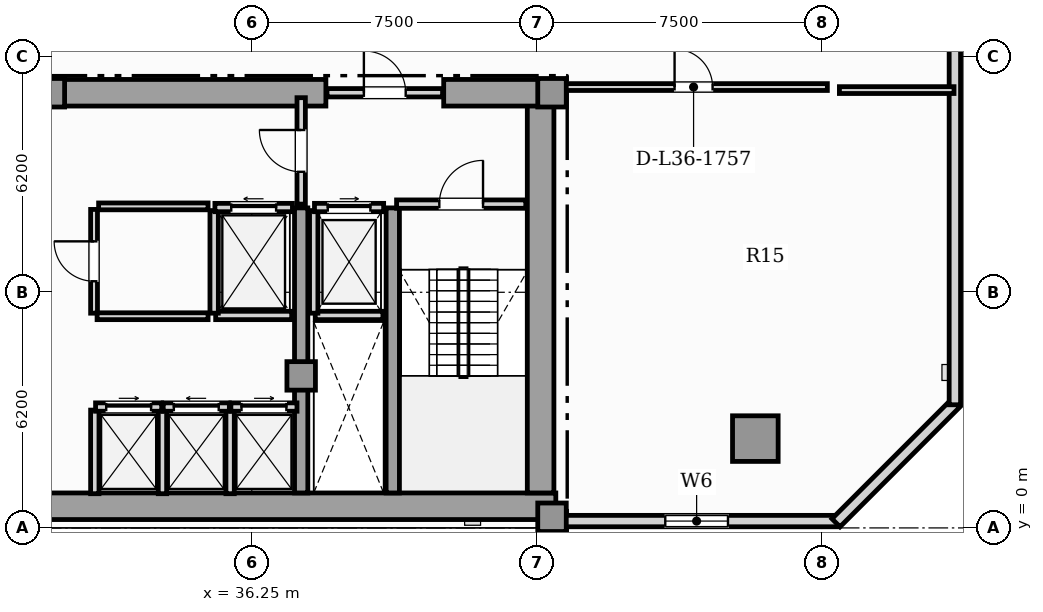
"""IFC4 building model, lengths in metres.
Left out: names, types, materials, properties, quantities, classifications, styles, units other than length and angle.
Written with IfcOpenShell. Run it as: python <this file> out.ifc"""

import sys

from ifc_helpers import new_model, si_unit, direction, frame, frame_2d, origin, origin_2d, place, context, subcontext, project, spatial, rectangle, hollow_rectangle, extrude, element, fill, save


model = new_model("IFC4")
c1 = context("Model", 3, precision=1e-05, world=origin(), true_north=direction((0.0, 1.0)))
c2 = subcontext(c1, "Body", "Model", "MODEL_VIEW")
j1 = project(units=[si_unit("LENGTHUNIT", "METRE"), si_unit("PLANEANGLEUNIT", "RADIAN")], contexts=[c1])
p1 = place(None, origin())
s1 = spatial("IfcSite", under=j1, at=p1, CompositionType="ELEMENT")
p2 = place(p1, origin())
s2 = spatial("IfcBuilding", under=s1, at=p2, CompositionType="ELEMENT")
p3 = place(p2, frame((0.0, 0.0, 149.05)))
s3 = spatial("IfcBuildingStorey", under=s2, at=p3, CompositionType="ELEMENT", Elevation=149.05)
p4 = place(p3, frame((13.25, 0.57, 0.0), z_axis=(0.0, 0.0, 1.0), x_axis=(1.0, 0.0, 0.0)))
e1 = element("IfcWall", 1, at=p4, inside=s3, PredefinedType="SHEAR", context=c2, shape_type="SweptSolid", body=[
    extrude(rectangle(XDim=31.0, YDim=0.7, at=frame_2d((15.5, 0.0))), origin(), (0.0, 0.0, 1.0), 3.63),
])
p5 = place(p3, frame((43.85, 0.92, 0.0), z_axis=(0.0, 0.0, 1.0), x_axis=(0.0, 1.0, 0.0)))
e2 = element("IfcWall", 2, at=p5, inside=s3, PredefinedType="SHEAR", context=c2, shape_type="SweptSolid", body=[
    extrude(rectangle(XDim=10.53, YDim=0.7, at=frame_2d((5.265, 0.0))), origin(), (0.0, 0.0, 1.0), 3.63),
])
p6 = place(p3, frame((30.9, 11.45, 0.0), z_axis=(0.0, 0.0, 1.0), x_axis=(1.0, 0.0, 0.0)))
e3 = element("IfcWall", 3, at=p6, inside=s3, PredefinedType="SHEAR", context=c2, shape_type="SweptSolid", body=[
    extrude(rectangle(XDim=7.3, YDim=0.7, at=frame_2d((3.65, 0.0))), origin(), (0.0, 0.0, 1.0), 3.63),
])
p7 = place(p3, frame((41.3, 11.45, 0.0), z_axis=(0.0, 0.0, 1.0), x_axis=(1.0, 0.0, 0.0)))
e4 = element("IfcWall", 4, at=p7, inside=s3, PredefinedType="SHEAR", context=c2, shape_type="SweptSolid", body=[
    extrude(rectangle(XDim=2.95, YDim=0.7, at=frame_2d((1.475, 0.0))), origin(), (0.0, 0.0, 1.0), 3.63),
])
for number, where, z_axis, x_axis in (
    (5, (37.55, 0.92, 0.0), (0.0, 0.0, 1.0), (0.0, 1.0, 0.0)),
    (6, (39.96, 0.92, 0.0), (0.0, 0.0, 1.0), (0.0, 1.0, 0.0)),
):
    element("IfcWall", number, at=place(p3, frame(where, z_axis=z_axis, x_axis=x_axis)), inside=s3, PredefinedType="SHEAR", context=c2, shape_type="SweptSolid", body=[
        extrude(rectangle(XDim=7.5, YDim=0.35, at=frame_2d((3.75, 0.0))), origin(), (0.0, 0.0, 1.0), 3.63),
    ])
for number, where, z_axis, x_axis in (
    (7, (44.15, 0.28, 0.0), (0.0, 0.0, 1.0), (1.0, 0.0, 0.0)),
    (8, (44.15, 11.45, 0.0), (0.0, 0.0, 1.0), (1.0, 0.0, 0.0)),
    (9, (37.55, 4.0, 0.0), (0.0, 0.0, 1.0), (1.0, 0.0, 0.0)),
    (10, (30.95, 11.45, 0.0), (0.0, 0.0, 1.0), (1.0, 0.0, 0.0)),
):
    element("IfcColumn", number, at=place(p3, frame(where, z_axis=z_axis, x_axis=x_axis)), inside=s3, PredefinedType="COLUMN", context=c2, shape_type="SweptSolid", body=[
        extrude(rectangle(XDim=0.75, YDim=0.75, at=origin_2d()), origin(), (0.0, 0.0, 1.0), 3.85),
    ])
p8 = place(p3, frame((49.5, 2.35, 0.0), z_axis=(0.0, 0.0, 1.0), x_axis=(1.0, 0.0, 0.0)))
e11 = element("IfcColumn", 11, at=p8, inside=s3, PredefinedType="USERDEFINED", context=c2, shape_type="SweptSolid", body=[
    extrude(hollow_rectangle(XDim=1.2, YDim=1.2, WallThickness=0.07, at=origin_2d()), origin(), (0.0, 0.0, 1.0), 3.85),
])
p9 = place(p3, frame((44.25, 0.18, 0.0), z_axis=(0.0, 0.0, 1.0), x_axis=(1.0, 0.0, 0.0)))
e12 = element("IfcWall", 12, at=p9, inside=s3, PredefinedType="SOLIDWALL", context=c2, shape_type="SweptSolid", body=[
    extrude(rectangle(XDim=7.41, YDim=0.3, at=frame_2d((3.705, 0.0))), origin(), (0.0, 0.0, 1.0), 3.63),
])
p10 = place(p9, frame((2.88, 0.0, 0.88)))
e13 = element("IfcOpeningElement", 13, at=p10, cuts=e12, PredefinedType="OPENING", context=c2, shape_type="SweptSolid", body=[
    extrude(rectangle(XDim=1.65, YDim=2.0, at=frame_2d((0.825, 1.0))), frame((0.0, 0.16, 0.0), z_axis=(0.0, -1.0, 0.0), x_axis=(1.0, 0.0, 0.0)), (0.0, 0.0, 1.0), 0.32),
])
p11 = place(p3, frame((51.622, 0.135, 0.0), z_axis=(0.0, 0.0, 1.0), x_axis=(0.707106781187, 0.707106781187, 0.0)))
e14 = element("IfcWall", 14, at=p11, inside=s3, PredefinedType="SOLIDWALL", context=c2, shape_type="SweptSolid", body=[
    extrude(rectangle(XDim=4.445, YDim=0.3, at=frame_2d((2.223, 0.0))), origin(), (0.0, 0.0, 1.0), 3.63),
])
p12 = place(p3, frame((54.75, 3.24, 0.0), z_axis=(0.0, 0.0, 1.0), x_axis=(0.0, 1.0, 0.0)))
e15 = element("IfcWall", 15, at=p12, inside=s3, PredefinedType="SOLIDWALL", context=c2, shape_type="SweptSolid", body=[
    extrude(rectangle(XDim=36.72, YDim=0.3, at=frame_2d((18.36, 0.0))), origin(), (0.0, 0.0, 1.0), 3.63),
])
p13 = place(p12, frame((30.56, 0.0, 0.95)))
e16 = element("IfcOpeningElement", 16, at=p13, cuts=e15, PredefinedType="OPENING", context=c2, shape_type="SweptSolid", body=[
    extrude(rectangle(XDim=0.9, YDim=1.5, at=frame_2d((0.45, 0.75))), frame((0.0, 0.16, 0.0), z_axis=(0.0, -1.0, 0.0), x_axis=(1.0, 0.0, 0.0)), (0.0, 0.0, 1.0), 0.32),
])
p14 = place(p12, frame((10.995, 0.0, 0.95)))
e17 = element("IfcOpeningElement", 17, at=p14, cuts=e15, PredefinedType="OPENING", context=c2, shape_type="SweptSolid", body=[
    extrude(rectangle(XDim=0.9, YDim=1.5, at=frame_2d((0.45, 0.75))), frame((0.0, 0.16, 0.0), z_axis=(0.0, -1.0, 0.0), x_axis=(1.0, 0.0, 0.0)), (0.0, 0.0, 1.0), 0.32),
])
p15 = place(p12, frame((13.304, 0.0, 0.88)))
e18 = element("IfcOpeningElement", 18, at=p15, cuts=e15, PredefinedType="OPENING", context=c2, shape_type="SweptSolid", body=[
    extrude(rectangle(XDim=1.65, YDim=2.0, at=frame_2d((0.825, 1.0))), frame((0.0, 0.16, 0.0), z_axis=(0.0, -1.0, 0.0), x_axis=(1.0, 0.0, 0.0)), (0.0, 0.0, 1.0), 0.32),
])
p16 = place(p12, frame((18.021, 0.0, 0.88)))
e19 = element("IfcOpeningElement", 19, at=p16, cuts=e15, PredefinedType="OPENING", context=c2, shape_type="SweptSolid", body=[
    extrude(rectangle(XDim=1.65, YDim=2.0, at=frame_2d((0.825, 1.0))), frame((0.0, 0.16, 0.0), z_axis=(0.0, -1.0, 0.0), x_axis=(1.0, 0.0, 0.0)), (0.0, 0.0, 1.0), 0.32),
])
p17 = place(p12, frame((25.201, 0.0, 0.88)))
e20 = element("IfcOpeningElement", 20, at=p17, cuts=e15, PredefinedType="OPENING", context=c2, shape_type="SweptSolid", body=[
    extrude(rectangle(XDim=1.65, YDim=2.0, at=frame_2d((0.825, 1.0))), frame((0.0, 0.16, 0.0), z_axis=(0.0, -1.0, 0.0), x_axis=(1.0, 0.0, 0.0)), (0.0, 0.0, 1.0), 0.32),
])
p18 = place(p12, frame((32.759, 0.0, 0.88)))
e21 = element("IfcOpeningElement", 21, at=p18, cuts=e15, PredefinedType="OPENING", context=c2, shape_type="SweptSolid", body=[
    extrude(rectangle(XDim=1.65, YDim=2.0, at=frame_2d((0.825, 1.0))), frame((0.0, 0.16, 0.0), z_axis=(0.0, -1.0, 0.0), x_axis=(1.0, 0.0, 0.0)), (0.0, 0.0, 1.0), 0.32),
])
p19 = place(p3, frame((37.92, 5.59, 0.0), z_axis=(0.0, 0.0, 1.0), x_axis=(1.0, 0.0, 0.0)))
e22 = element("IfcWall", 22, at=p19, inside=s3, PredefinedType="SOLIDWALL", context=c2, shape_type="SweptSolid", body=[
    extrude(rectangle(XDim=1.78, YDim=0.22, at=frame_2d((0.89, 0.0))), origin(), (0.0, 0.0, 1.0), 3.63),
])
p20 = place(p3, frame((37.88, 5.65, 0.0), z_axis=(0.0, 0.0, 1.0), x_axis=(0.0, 1.0, 0.0)))
e23 = element("IfcWall", 23, at=p20, inside=s3, PredefinedType="SOLIDWALL", context=c2, shape_type="SweptSolid", body=[
    extrude(rectangle(XDim=2.7, YDim=0.22, at=frame_2d((1.35, 0.0))), origin(), (0.0, 0.0, 1.0), 3.63),
])
p21 = place(p3, frame((37.9, 8.43, 0.0), z_axis=(0.0, 0.0, 1.0), x_axis=(1.0, 0.0, 0.0)))
e24 = element("IfcWall", 24, at=p21, inside=s3, PredefinedType="SOLIDWALL", context=c2, shape_type="SweptSolid", body=[
    extrude(rectangle(XDim=1.82, YDim=0.22, at=frame_2d((0.91, 0.0))), origin(), (0.0, 0.0, 1.0), 3.63),
])
p22 = place(p21, frame((0.35, 0.0, 0.0)))
e25 = element("IfcOpeningElement", 25, at=p22, cuts=e24, PredefinedType="OPENING", context=c2, shape_type="SweptSolid", body=[
    extrude(rectangle(XDim=1.12, YDim=2.25, at=frame_2d((0.56, 1.125))), frame((0.0, 0.12, 0.0), z_axis=(0.0, -1.0, 0.0), x_axis=(1.0, 0.0, 0.0)), (0.0, 0.0, 1.0), 0.24),
])
p23 = place(p3, frame((35.3, 5.59, 0.0), z_axis=(0.0, 0.0, 1.0), x_axis=(1.0, 0.0, 0.0)))
e26 = element("IfcWall", 26, at=p23, inside=s3, PredefinedType="SOLIDWALL", context=c2, shape_type="SweptSolid", body=[
    extrude(rectangle(XDim=2.0, YDim=0.22, at=frame_2d((1.0, 0.0))), origin(), (0.0, 0.0, 1.0), 3.63),
])
p24 = place(p3, frame((35.26, 5.65, 0.0), z_axis=(0.0, 0.0, 1.0), x_axis=(0.0, 1.0, 0.0)))
e27 = element("IfcWall", 27, at=p24, inside=s3, PredefinedType="SOLIDWALL", context=c2, shape_type="SweptSolid", body=[
    extrude(rectangle(XDim=2.7, YDim=0.22, at=frame_2d((1.35, 0.0))), origin(), (0.0, 0.0, 1.0), 3.63),
])
p25 = place(p3, frame((35.28, 8.43, 0.0), z_axis=(0.0, 0.0, 1.0), x_axis=(1.0, 0.0, 0.0)))
e28 = element("IfcWall", 28, at=p25, inside=s3, PredefinedType="SOLIDWALL", context=c2, shape_type="SweptSolid", body=[
    extrude(rectangle(XDim=2.04, YDim=0.22, at=frame_2d((1.02, 0.0))), origin(), (0.0, 0.0, 1.0), 3.63),
])
p26 = place(p25, frame((0.43, 0.0, 0.0)))
e29 = element("IfcOpeningElement", 29, at=p26, cuts=e28, PredefinedType="OPENING", context=c2, shape_type="SweptSolid", body=[
    extrude(rectangle(XDim=1.18, YDim=2.2, at=frame_2d((0.59, 1.1))), frame((0.0, 0.12, 0.0), z_axis=(0.0, -1.0, 0.0), x_axis=(1.0, 0.0, 0.0)), (0.0, 0.0, 1.0), 0.24),
])
for number, where, z_axis, x_axis in (
    (30, (32.12, 0.9, 0.0), (0.0, 0.0, 1.0), (0.0, 1.0, 0.0)),
    (31, (33.9, 0.9, 0.0), (0.0, 0.0, 1.0), (0.0, 1.0, 0.0)),
):
    element("IfcWall", number, at=place(p3, frame(where, z_axis=z_axis, x_axis=x_axis)), inside=s3, PredefinedType="SOLIDWALL", context=c2, shape_type="SweptSolid", body=[
        extrude(rectangle(XDim=2.2, YDim=0.22, at=frame_2d((1.1, 0.0))), origin(), (0.0, 0.0, 1.0), 3.63),
    ])
p27 = place(p3, frame((32.14, 3.18, 0.0), z_axis=(0.0, 0.0, 1.0), x_axis=(1.0, 0.0, 0.0)))
e32 = element("IfcWall", 32, at=p27, inside=s3, PredefinedType="SOLIDWALL", context=c2, shape_type="SweptSolid", body=[
    extrude(rectangle(XDim=1.74, YDim=0.22, at=frame_2d((0.87, 0.0))), origin(), (0.0, 0.0, 1.0), 3.63),
])
p28 = place(p27, frame((0.28, 0.0, 0.0)))
e33 = element("IfcOpeningElement", 33, at=p28, cuts=e32, PredefinedType="OPENING", context=c2, shape_type="SweptSolid", body=[
    extrude(rectangle(XDim=1.18, YDim=2.2, at=frame_2d((0.59, 1.1))), frame((0.0, 0.12, 0.0), z_axis=(0.0, -1.0, 0.0), x_axis=(1.0, 0.0, 0.0)), (0.0, 0.0, 1.0), 0.24),
])
p29 = place(p3, frame((35.68, 0.9, 0.0), z_axis=(0.0, 0.0, 1.0), x_axis=(0.0, 1.0, 0.0)))
e34 = element("IfcWall", 34, at=p29, inside=s3, PredefinedType="SOLIDWALL", context=c2, shape_type="SweptSolid", body=[
    extrude(rectangle(XDim=2.2, YDim=0.22, at=frame_2d((1.1, 0.0))), origin(), (0.0, 0.0, 1.0), 3.63),
])
p30 = place(p3, frame((33.92, 3.18, 0.0), z_axis=(0.0, 0.0, 1.0), x_axis=(1.0, 0.0, 0.0)))
e35 = element("IfcWall", 35, at=p30, inside=s3, PredefinedType="SOLIDWALL", context=c2, shape_type="SweptSolid", body=[
    extrude(rectangle(XDim=1.74, YDim=0.22, at=frame_2d((0.87, 0.0))), origin(), (0.0, 0.0, 1.0), 3.63),
])
p31 = place(p30, frame((0.28, 0.0, 0.0)))
e36 = element("IfcOpeningElement", 36, at=p31, cuts=e35, PredefinedType="OPENING", context=c2, shape_type="SweptSolid", body=[
    extrude(rectangle(XDim=1.18, YDim=2.2, at=frame_2d((0.59, 1.1))), frame((0.0, 0.12, 0.0), z_axis=(0.0, -1.0, 0.0), x_axis=(1.0, 0.0, 0.0)), (0.0, 0.0, 1.0), 0.24),
])
p32 = place(p3, frame((35.7, 3.18, 0.0), z_axis=(0.0, 0.0, 1.0), x_axis=(1.0, 0.0, 0.0)))
e37 = element("IfcWall", 37, at=p32, inside=s3, PredefinedType="SOLIDWALL", context=c2, shape_type="SweptSolid", body=[
    extrude(rectangle(XDim=1.74, YDim=0.22, at=frame_2d((0.87, 0.0))), origin(), (0.0, 0.0, 1.0), 3.63),
])
p33 = place(p32, frame((0.28, 0.0, 0.0)))
e38 = element("IfcOpeningElement", 38, at=p33, cuts=e37, PredefinedType="OPENING", context=c2, shape_type="SweptSolid", body=[
    extrude(rectangle(XDim=1.18, YDim=2.2, at=frame_2d((0.59, 1.1))), frame((0.0, 0.12, 0.0), z_axis=(0.0, -1.0, 0.0), x_axis=(1.0, 0.0, 0.0)), (0.0, 0.0, 1.0), 0.24),
])
p34 = place(p3, frame((40.06, 8.52, 0.0), z_axis=(0.0, 0.0, 1.0), x_axis=(1.0, 0.0, 0.0)))
e39 = element("IfcWall", 39, at=p34, inside=s3, PredefinedType="SOLIDWALL", context=c2, shape_type="SweptSolid", body=[
    extrude(rectangle(XDim=3.4, YDim=0.22, at=frame_2d((1.7, 0.0))), origin(), (0.0, 0.0, 1.0), 3.63),
])
p35 = place(p34, frame((1.125, 0.0, 0.0)))
e40 = element("IfcOpeningElement", 40, at=p35, cuts=e39, PredefinedType="OPENING", context=c2, shape_type="SweptSolid", body=[
    extrude(rectangle(XDim=1.15, YDim=2.2, at=frame_2d((0.575, 1.1))), frame((0.0, 0.12, 0.0), z_axis=(0.0, -1.0, 0.0), x_axis=(1.0, 0.0, 0.0)), (0.0, 0.0, 1.0), 0.24),
])
p36 = place(p3, frame((37.55, 8.52, 0.0), z_axis=(0.0, 0.0, 1.0), x_axis=(0.0, 1.0, 0.0)))
e41 = element("IfcWall", 41, at=p36, inside=s3, PredefinedType="SOLIDWALL", context=c2, shape_type="SweptSolid", body=[
    extrude(rectangle(XDim=2.8, YDim=0.22, at=frame_2d((1.4, 0.0))), origin(), (0.0, 0.0, 1.0), 3.085),
])
p37 = place(p36, frame((0.85, 0.0, 0.0)))
e42 = element("IfcOpeningElement", 42, at=p37, cuts=e41, PredefinedType="OPENING", context=c2, shape_type="SweptSolid", body=[
    extrude(rectangle(XDim=1.1, YDim=2.2, at=frame_2d((0.55, 1.1))), frame((0.0, 0.12, 0.0), z_axis=(0.0, -1.0, 0.0), x_axis=(1.0, 0.0, 0.0)), (0.0, 0.0, 1.0), 0.24),
])
p38 = place(p3, frame((38.23, 11.45, 0.0), z_axis=(0.0, 0.0, 1.0), x_axis=(1.0, 0.0, 0.0)))
e43 = element("IfcWall", 43, at=p38, inside=s3, PredefinedType="SOLIDWALL", context=c2, shape_type="SweptSolid", body=[
    extrude(rectangle(XDim=3.04, YDim=0.22, at=frame_2d((1.52, 0.0))), origin(), (0.0, 0.0, 1.0), 3.63),
])
p39 = place(p38, frame((0.97, 0.0, 0.0)))
e44 = element("IfcOpeningElement", 44, at=p39, cuts=e43, PredefinedType="OPENING", context=c2, shape_type="SweptSolid", body=[
    extrude(rectangle(XDim=1.1, YDim=2.2, at=frame_2d((0.55, 1.1))), frame((0.0, 0.12, 0.0), z_axis=(0.0, -1.0, 0.0), x_axis=(1.0, 0.0, 0.0)), (0.0, 0.0, 1.0), 0.24),
])
p40 = place(p3, frame((32.1, 5.65, 0.0), z_axis=(0.0, 0.0, 1.0), x_axis=(0.0, 1.0, 0.0)))
e45 = element("IfcWall", 45, at=p40, inside=s3, PredefinedType="PARTITIONING", context=c2, shape_type="SweptSolid", body=[
    extrude(rectangle(XDim=2.73, YDim=0.18, at=frame_2d((1.365, 0.0))), origin(), (0.0, 0.0, 1.0), 3.63),
])
p41 = place(p40, frame((0.84, 0.0, 0.0)))
e46 = element("IfcOpeningElement", 46, at=p41, cuts=e45, PredefinedType="OPENING", context=c2, shape_type="SweptSolid", body=[
    extrude(rectangle(XDim=1.05, YDim=2.15, at=frame_2d((0.525, 1.075))), frame((0.0, 0.1, 0.0), z_axis=(0.0, -1.0, 0.0), x_axis=(1.0, 0.0, 0.0)), (0.0, 0.0, 1.0), 0.2),
])
p42 = place(p3, frame((32.22, 8.46, 0.0), z_axis=(0.0, 0.0, 1.0), x_axis=(1.0, 0.0, 0.0)))
e47 = element("IfcWall", 47, at=p42, inside=s3, PredefinedType="PARTITIONING", context=c2, shape_type="SweptSolid", body=[
    extrude(rectangle(XDim=2.88, YDim=0.18, at=frame_2d((1.44, 0.0))), origin(), (0.0, 0.0, 1.0), 3.63),
])
p43 = place(p3, frame((32.18, 5.57, 0.0), z_axis=(0.0, 0.0, 1.0), x_axis=(1.0, 0.0, 0.0)))
e48 = element("IfcWall", 48, at=p43, inside=s3, PredefinedType="PARTITIONING", context=c2, shape_type="SweptSolid", body=[
    extrude(rectangle(XDim=2.92, YDim=0.18, at=frame_2d((1.46, 0.0))), origin(), (0.0, 0.0, 1.0), 3.63),
])
p44 = place(p3, frame((44.355, 11.6, 0.0), z_axis=(0.0, 0.0, 1.0), x_axis=(1.0, 0.0, 0.0)))
e49 = element("IfcWall", 49, at=p44, inside=s3, PredefinedType="PARTITIONING", context=c2, shape_type="SweptSolid", body=[
    extrude(rectangle(XDim=7.04, YDim=0.18, at=frame_2d((3.52, 0.0))), origin(), (0.0, 0.0, 1.0), 3.63),
])
p45 = place(p44, frame((3.02, 0.0, 0.0)))
e50 = element("IfcOpeningElement", 50, at=p45, cuts=e49, PredefinedType="OPENING", context=c2, shape_type="SweptSolid", body=[
    extrude(rectangle(XDim=1.0, YDim=2.15, at=frame_2d((0.5, 1.075))), frame((0.0, 0.1, 0.0), z_axis=(0.0, -1.0, 0.0), x_axis=(1.0, 0.0, 0.0)), (0.0, 0.0, 1.0), 0.2),
])
p46 = place(p3, frame((51.712, 11.52, 0.0), z_axis=(0.0, 0.0, 1.0), x_axis=(1.0, 0.0, 0.0)))
e51 = element("IfcWall", 51, at=p46, inside=s3, PredefinedType="PARTITIONING", context=c2, shape_type="SweptSolid", body=[
    extrude(rectangle(XDim=3.015, YDim=0.18, at=frame_2d((1.508, 0.0))), origin(), (0.0, 0.0, 1.0), 3.63),
])
p47 = place(p10, origin())
e52 = element("IfcWindow", 52, at=p47, inside=s3, PartitioningType="SINGLE_PANEL", PredefinedType="WINDOW", context=c2, shape_type="SweptSolid", body=[
    extrude(rectangle(XDim=1.65, YDim=2.0, at=frame_2d((0.825, 1.0))), frame((0.0, 0.03, 0.0), z_axis=(0.0, -1.0, 0.0), x_axis=(1.0, 0.0, 0.0)), (0.0, 0.0, 1.0), 0.06),
])
fill(e13, e52)
p48 = place(p22, origin())
e53 = element("IfcDoor", 53, at=p48, inside=s3, OperationType="SLIDING_TO_RIGHT", PredefinedType="DOOR", context=c2, shape_type="SweptSolid", body=[
    extrude(rectangle(XDim=1.12, YDim=2.25, at=frame_2d((0.56, 1.125))), frame((0.0, 0.025, 0.0), z_axis=(0.0, -1.0, 0.0), x_axis=(1.0, 0.0, 0.0)), (0.0, 0.0, 1.0), 0.05),
])
fill(e25, e53)
p49 = place(p26, origin())
e54 = element("IfcDoor", 54, at=p49, inside=s3, OperationType="SLIDING_TO_LEFT", PredefinedType="DOOR", context=c2, shape_type="SweptSolid", body=[
    extrude(rectangle(XDim=1.18, YDim=2.2, at=frame_2d((0.59, 1.1))), frame((0.0, 0.025, 0.0), z_axis=(0.0, -1.0, 0.0), x_axis=(1.0, 0.0, 0.0)), (0.0, 0.0, 1.0), 0.05),
])
fill(e29, e54)
p50 = place(p28, origin())
e55 = element("IfcDoor", 55, at=p50, inside=s3, OperationType="SLIDING_TO_RIGHT", PredefinedType="DOOR", context=c2, shape_type="SweptSolid", body=[
    extrude(rectangle(XDim=1.18, YDim=2.2, at=frame_2d((0.59, 1.1))), frame((0.0, 0.025, 0.0), z_axis=(0.0, -1.0, 0.0), x_axis=(1.0, 0.0, 0.0)), (0.0, 0.0, 1.0), 0.05),
])
fill(e33, e55)
p51 = place(p31, origin())
e56 = element("IfcDoor", 56, at=p51, inside=s3, OperationType="SLIDING_TO_LEFT", PredefinedType="DOOR", context=c2, shape_type="SweptSolid", body=[
    extrude(rectangle(XDim=1.18, YDim=2.2, at=frame_2d((0.59, 1.1))), frame((0.0, 0.025, 0.0), z_axis=(0.0, -1.0, 0.0), x_axis=(1.0, 0.0, 0.0)), (0.0, 0.0, 1.0), 0.05),
])
fill(e36, e56)
p52 = place(p33, origin())
e57 = element("IfcDoor", 57, at=p52, inside=s3, OperationType="SLIDING_TO_RIGHT", PredefinedType="DOOR", context=c2, shape_type="SweptSolid", body=[
    extrude(rectangle(XDim=1.18, YDim=2.2, at=frame_2d((0.59, 1.1))), frame((0.0, 0.025, 0.0), z_axis=(0.0, -1.0, 0.0), x_axis=(1.0, 0.0, 0.0)), (0.0, 0.0, 1.0), 0.05),
])
fill(e38, e57)
p53 = place(p35, origin())
e58 = element("IfcDoor", 58, at=p53, inside=s3, OperationType="SINGLE_SWING_RIGHT", PredefinedType="DOOR", context=c2, shape_type="SweptSolid", body=[
    extrude(rectangle(XDim=1.15, YDim=2.2, at=frame_2d((0.575, 1.1))), frame((0.0, 0.025, 0.0), z_axis=(0.0, -1.0, 0.0), x_axis=(1.0, 0.0, 0.0)), (0.0, 0.0, 1.0), 0.05),
])
fill(e40, e58)
p54 = place(p37, origin())
e59 = element("IfcDoor", 59, at=p54, inside=s3, OperationType="SINGLE_SWING_RIGHT", PredefinedType="DOOR", context=c2, shape_type="SweptSolid", body=[
    extrude(rectangle(XDim=1.1, YDim=2.2, at=frame_2d((0.55, 1.1))), frame((0.0, 0.025, 0.0), z_axis=(0.0, -1.0, 0.0), x_axis=(1.0, 0.0, 0.0)), (0.0, 0.0, 1.0), 0.05),
])
fill(e42, e59)
p55 = place(p39, origin())
e60 = element("IfcDoor", 60, at=p55, inside=s3, OperationType="SINGLE_SWING_LEFT", PredefinedType="DOOR", context=c2, shape_type="SweptSolid", body=[
    extrude(rectangle(XDim=1.1, YDim=2.2, at=frame_2d((0.55, 1.1))), frame((0.0, 0.025, 0.0), z_axis=(0.0, -1.0, 0.0), x_axis=(1.0, 0.0, 0.0)), (0.0, 0.0, 1.0), 0.05),
])
fill(e44, e60)
p56 = place(p41, origin())
e61 = element("IfcDoor", 61, at=p56, inside=s3, OperationType="SINGLE_SWING_RIGHT", PredefinedType="DOOR", context=c2, shape_type="SweptSolid", body=[
    extrude(rectangle(XDim=1.05, YDim=2.15, at=frame_2d((0.525, 1.075))), frame((0.0, 0.025, 0.0), z_axis=(0.0, -1.0, 0.0), x_axis=(1.0, 0.0, 0.0)), (0.0, 0.0, 1.0), 0.05),
])
fill(e46, e61)
p57 = place(p45, origin())
e62 = element("IfcDoor", 62, at=p57, inside=s3, OperationType="SINGLE_SWING_LEFT", PredefinedType="DOOR", context=c2, shape_type="SweptSolid", body=[
    extrude(rectangle(XDim=1.0, YDim=2.15, at=frame_2d((0.5, 1.075))), frame((0.0, 0.025, 0.0), z_axis=(0.0, -1.0, 0.0), x_axis=(1.0, 0.0, 0.0)), (0.0, 0.0, 1.0), 0.05),
])
fill(e50, e62)
save(model, sys.argv[1])
